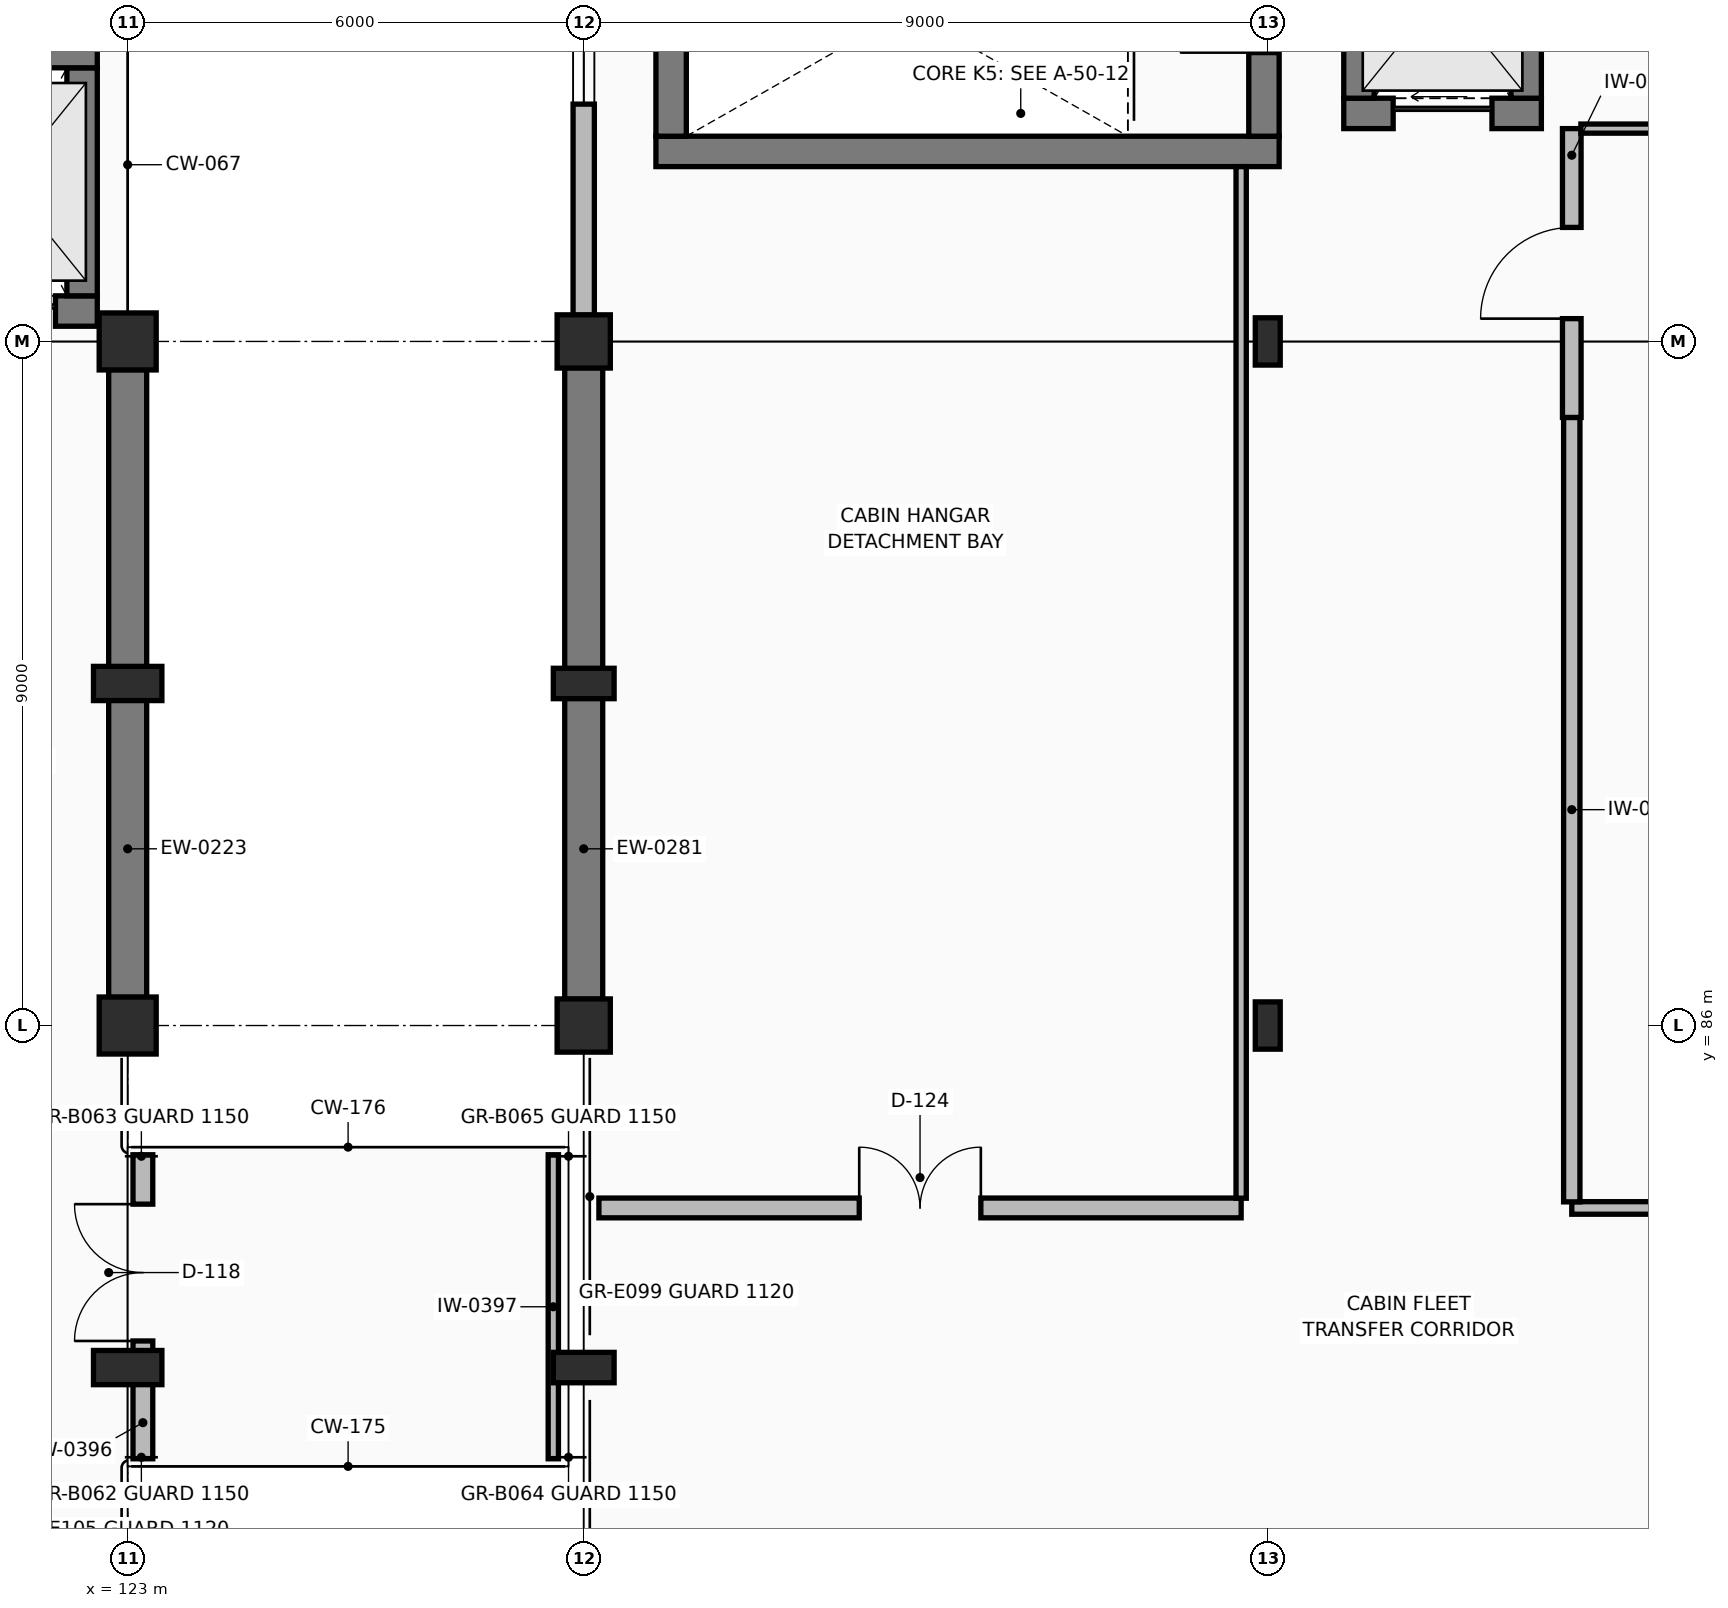
"""IFC4 building model, lengths in metres.
Left out: names, types, materials, properties, quantities, classifications, styles, units other than length and angle.
Written with IfcOpenShell. Run it as: python <this file> out.ifc"""

import sys

from ifc_helpers import new_model, si_unit, direction, frame, frame_2d, origin, origin_2d, place, context, subcontext, project, spatial, rectangle, i_section, extrude, element, fill, save


model = new_model("IFC4")
c1 = context("Model", 3, precision=1e-05, world=origin(), true_north=direction((0.0, 1.0)))
c2 = subcontext(c1, "Body", "Model", "MODEL_VIEW")
j1 = project(units=[si_unit("LENGTHUNIT", "METRE"), si_unit("PLANEANGLEUNIT", "RADIAN")], contexts=[c1])
p1 = place(None, origin())
s1 = spatial("IfcSite", under=j1, at=p1, CompositionType="ELEMENT")
p2 = place(p1, origin())
s2 = spatial("IfcBuilding", under=s1, at=p2, CompositionType="ELEMENT")
p3 = place(p2, frame((0.0, 0.0, 9.6)))
s3 = spatial("IfcBuildingStorey", under=s2, at=p3, CompositionType="ELEMENT", Elevation=9.6)
for number, where, z_axis, x_axis in (
    (1, (123.0, 86.0, 0.0), (0.0, 0.0, 1.0), (1.0, 0.0, 0.0)),
    (2, (123.0, 95.0, 0.0), (0.0, 0.0, 1.0), (1.0, 0.0, 0.0)),
):
    element("IfcColumn", number, at=place(p3, frame(where, z_axis=z_axis, x_axis=x_axis)), inside=s3, PredefinedType="COLUMN", context=c2, shape_type="SweptSolid", body=[
        extrude(rectangle(XDim=0.75, YDim=0.75, at=origin_2d()), origin(), (0.0, 0.0, 1.0), 4.8),
    ])
for number, where, z_axis, x_axis in (
    (3, (123.0, 81.5, 0.0), (0.0, 0.0, 1.0), (0.0, 1.0, 0.0)),
    (4, (123.0, 90.5, 0.0), (0.0, 0.0, 1.0), (0.0, 1.0, 0.0)),
):
    element("IfcColumn", number, at=place(p3, frame(where, z_axis=z_axis, x_axis=x_axis)), inside=s3, PredefinedType="PILASTER", context=c2, shape_type="SweptSolid", body=[
        extrude(rectangle(XDim=0.45, YDim=0.9, at=origin_2d()), origin(), (0.0, 0.0, 1.0), 4.8),
    ])
for number, where, z_axis, x_axis in (
    (5, (129.0, 86.0, 0.0), (0.0, 0.0, 1.0), (1.0, 0.0, 0.0)),
    (6, (129.0, 95.0, 0.0), (0.0, 0.0, 1.0), (1.0, 0.0, 0.0)),
):
    element("IfcColumn", number, at=place(p3, frame(where, z_axis=z_axis, x_axis=x_axis)), inside=s3, PredefinedType="COLUMN", context=c2, shape_type="SweptSolid", body=[
        extrude(rectangle(XDim=0.7, YDim=0.7, at=origin_2d()), origin(), (0.0, 0.0, 1.0), 4.8),
    ])
for number, where, z_axis, x_axis in (
    (7, (138.0, 86.0, 0.0), (0.0, 0.0, 1.0), (1.0, 0.0, 0.0)),
    (8, (138.0, 95.0, 0.0), (0.0, 0.0, 1.0), (1.0, 0.0, 0.0)),
):
    element("IfcColumn", number, at=place(p3, frame(where, z_axis=z_axis, x_axis=x_axis)), inside=s3, PredefinedType="COLUMN", context=c2, shape_type="SweptSolid", body=[
        extrude(i_section(OverallWidth=0.328, OverallDepth=0.622, WebThickness=0.015, FlangeThickness=0.024, at=origin_2d()), origin(), (0.0, 0.0, 1.0), 4.8),
    ])
for number, where, z_axis, x_axis in (
    (9, (129.0, 81.5, 0.0), (0.0, 0.0, 1.0), (0.0, 1.0, 0.0)),
    (10, (129.0, 90.5, 0.0), (0.0, 0.0, 1.0), (0.0, 1.0, 0.0)),
):
    element("IfcColumn", number, at=place(p3, frame(where, z_axis=z_axis, x_axis=x_axis)), inside=s3, PredefinedType="PILASTER", context=c2, shape_type="SweptSolid", body=[
        extrude(rectangle(XDim=0.4, YDim=0.8, at=origin_2d()), origin(), (0.0, 0.0, 1.0), 4.8),
    ])
for number, where, z_axis, x_axis in (
    (11, (123.0, 86.37, 0.0), (0.0, 0.0, 1.0), (0.0, 1.0, 0.0)),
    (12, (123.0, 90.72, 0.0), (0.0, 0.0, 1.0), (0.0, 1.0, 0.0)),
):
    element("IfcWall", number, at=place(p3, frame(where, z_axis=z_axis, x_axis=x_axis)), inside=s3, PredefinedType="SHEAR", context=c2, shape_type="SweptSolid", body=[
        extrude(rectangle(XDim=3.91, YDim=0.5, at=frame_2d((1.955, 0.0))), origin(), (0.0, 0.0, 1.0), 2.752),
    ])
for number, where, z_axis, x_axis in (
    (13, (129.0, 94.655, 0.0), (0.0, 0.0, 1.0), (0.0, -1.0, 0.0)),
    (14, (129.0, 90.305, 0.0), (0.0, 0.0, 1.0), (0.0, -1.0, 0.0)),
):
    element("IfcWall", number, at=place(p3, frame(where, z_axis=z_axis, x_axis=x_axis)), inside=s3, PredefinedType="SHEAR", context=c2, shape_type="SweptSolid", body=[
        extrude(rectangle(XDim=3.96, YDim=0.5, at=frame_2d((1.98, 0.0))), origin(), (0.0, 0.0, 1.0), 2.752),
    ])
p4 = place(p3, frame((129.0, 101.699, 0.0), z_axis=(0.0, 0.0, 1.0), x_axis=(0.0, -1.0, 0.0)))
e15 = element("IfcWall", 15, at=p4, inside=s3, PredefinedType="SOLIDWALL", context=c2, shape_type="SweptSolid", body=[
    extrude(rectangle(XDim=6.354, YDim=0.28, at=frame_2d((3.177, 0.0))), origin(), (0.0, 0.0, 1.0), 4.225),
])
p5 = place(p4, frame((1.277, 0.0, 0.9)))
e16 = element("IfcOpeningElement", 16, at=p5, cuts=e15, PredefinedType="OPENING", context=c2, shape_type="SweptSolid", body=[
    extrude(rectangle(XDim=2.3, YDim=1.5, at=frame_2d((1.15, 0.75))), frame((0.0, 0.15, 0.0), z_axis=(0.0, -1.0, 0.0), x_axis=(1.0, 0.0, 0.0)), (0.0, 0.0, 1.0), 0.3),
])
p6 = place(p3, frame((120.2, 95.4, 0.0), z_axis=(0.0, 0.0, 1.0), x_axis=(1.0, 0.0, 0.0)))
e17 = element("IfcWall", 17, at=p6, inside=s3, PredefinedType="SHEAR", context=c2, shape_type="SweptSolid", body=[
    extrude(rectangle(XDim=2.4, YDim=0.4, at=frame_2d((1.2, 0.0))), origin(), (0.0, 0.0, 1.0), 4.49),
])
p7 = place(p6, frame((0.55, 0.0, 0.0)))
e18 = element("IfcOpeningElement", 18, at=p7, cuts=e17, PredefinedType="OPENING", context=c2, shape_type="SweptSolid", body=[
    extrude(rectangle(XDim=1.3, YDim=2.25, at=frame_2d((0.65, 1.125))), frame((0.0, 0.21, 0.0), z_axis=(0.0, -1.0, 0.0), x_axis=(1.0, 0.0, 0.0)), (0.0, 0.0, 1.0), 0.42),
])
p8 = place(p3, frame((122.4, 95.6, 0.0), z_axis=(0.0, 0.0, 1.0), x_axis=(0.0, 1.0, 0.0)))
e19 = element("IfcWall", 19, at=p8, inside=s3, PredefinedType="SHEAR", context=c2, shape_type="SweptSolid", body=[
    extrude(rectangle(XDim=3.0, YDim=0.4, at=frame_2d((1.5, 0.0))), origin(), (0.0, 0.0, 1.0), 4.49),
])
p9 = place(p3, frame((122.6, 98.8, 0.0), z_axis=(0.0, 0.0, 1.0), x_axis=(-1.0, 0.0, 0.0)))
e20 = element("IfcWall", 20, at=p9, inside=s3, PredefinedType="SHEAR", context=c2, shape_type="SweptSolid", body=[
    extrude(rectangle(XDim=2.4, YDim=0.4, at=frame_2d((1.2, 0.0))), origin(), (0.0, 0.0, 1.0), 4.49),
])
p10 = place(p3, frame((129.95, 97.5, 0.0), z_axis=(0.0, 0.0, 1.0), x_axis=(1.0, 0.0, 0.0)))
e21 = element("IfcWall", 21, at=p10, inside=s3, PredefinedType="SHEAR", context=c2, shape_type="SweptSolid", body=[
    extrude(rectangle(XDim=8.2, YDim=0.4, at=frame_2d((4.1, 0.0))), origin(), (0.0, 0.0, 1.0), 4.49),
])
p11 = place(p3, frame((137.95, 97.7, 0.0), z_axis=(0.0, 0.0, 1.0), x_axis=(0.0, 1.0, 0.0)))
e22 = element("IfcWall", 22, at=p11, inside=s3, PredefinedType="SHEAR", context=c2, shape_type="SweptSolid", body=[
    extrude(rectangle(XDim=3.3, YDim=0.4, at=frame_2d((1.65, 0.0))), origin(), (0.0, 0.0, 1.0), 4.49),
])
p12 = place(p11, frame((1.1, 0.0, 0.0)))
e23 = element("IfcOpeningElement", 23, at=p12, cuts=e22, PredefinedType="OPENING", context=c2, shape_type="SweptSolid", body=[
    extrude(rectangle(XDim=1.1, YDim=2.2, at=frame_2d((0.55, 1.1))), frame((0.0, 0.21, 0.0), z_axis=(0.0, -1.0, 0.0), x_axis=(1.0, 0.0, 0.0)), (0.0, 0.0, 1.0), 0.42),
])
p13 = place(p3, frame((130.15, 101.0, 0.0), z_axis=(0.0, 0.0, 1.0), x_axis=(0.0, -1.0, 0.0)))
e24 = element("IfcWall", 24, at=p13, inside=s3, PredefinedType="SHEAR", context=c2, shape_type="SweptSolid", body=[
    extrude(rectangle(XDim=3.3, YDim=0.4, at=frame_2d((1.65, 0.0))), origin(), (0.0, 0.0, 1.0), 4.49),
])
p14 = place(p3, frame((139.0, 98.0, 0.0), z_axis=(0.0, 0.0, 1.0), x_axis=(1.0, 0.0, 0.0)))
e25 = element("IfcWall", 25, at=p14, inside=s3, PredefinedType="SHEAR", context=c2, shape_type="SweptSolid", body=[
    extrude(rectangle(XDim=2.6, YDim=0.4, at=frame_2d((1.3, 0.0))), origin(), (0.0, 0.0, 1.0), 4.49),
])
p15 = place(p14, frame((0.65, 0.0, 0.0)))
e26 = element("IfcOpeningElement", 26, at=p15, cuts=e25, PredefinedType="OPENING", context=c2, shape_type="SweptSolid", body=[
    extrude(rectangle(XDim=1.3, YDim=2.25, at=frame_2d((0.65, 1.125))), frame((0.0, 0.21, 0.0), z_axis=(0.0, -1.0, 0.0), x_axis=(1.0, 0.0, 0.0)), (0.0, 0.0, 1.0), 0.42),
])
for number, where, z_axis, x_axis in (
    (27, (141.4, 98.2, 0.0), (0.0, 0.0, 1.0), (0.0, 1.0, 0.0)),
    (28, (139.2, 101.0, 0.0), (0.0, 0.0, 1.0), (0.0, -1.0, 0.0)),
):
    element("IfcWall", number, at=place(p3, frame(where, z_axis=z_axis, x_axis=x_axis)), inside=s3, PredefinedType="SHEAR", context=c2, shape_type="SweptSolid", body=[
        extrude(rectangle(XDim=2.8, YDim=0.4, at=frame_2d((1.4, 0.0))), origin(), (0.0, 0.0, 1.0), 4.49),
    ])
p16 = place(p3, frame((123.2, 80.3, 0.0), z_axis=(0.0, 0.0, 1.0), x_axis=(0.0, 1.0, 0.0)))
e29 = element("IfcWall", 29, at=p16, inside=s3, PredefinedType="PARTITIONING", context=c2, shape_type="SweptSolid", body=[
    extrude(rectangle(XDim=4.0, YDim=0.26, at=frame_2d((2.0, 0.0))), origin(), (0.0, 0.0, 1.0), 2.742),
])
p17 = place(p16, frame((1.55, 0.0, 0.0)))
e30 = element("IfcOpeningElement", 30, at=p17, cuts=e29, PredefinedType="OPENING", context=c2, shape_type="SweptSolid", body=[
    extrude(rectangle(XDim=1.8, YDim=2.3, at=frame_2d((0.9, 1.15))), frame((0.0, 0.14, 0.0), z_axis=(0.0, -1.0, 0.0), x_axis=(1.0, 0.0, 0.0)), (0.0, 0.0, 1.0), 0.28),
])
p18 = place(p3, frame((128.6, 80.3, 0.0), z_axis=(0.0, 0.0, 1.0), x_axis=(0.0, 1.0, 0.0)))
e31 = element("IfcWall", 31, at=p18, inside=s3, PredefinedType="PARTITIONING", context=c2, shape_type="SweptSolid", body=[
    extrude(rectangle(XDim=4.0, YDim=0.135, at=frame_2d((2.0, 0.0))), origin(), (0.0, 0.0, 1.0), 2.742),
])
p19 = place(p3, frame((129.2, 83.6, 0.0), z_axis=(0.0, 0.0, 1.0), x_axis=(1.0, 0.0, 0.0)))
e32 = element("IfcWall", 32, at=p19, inside=s3, PredefinedType="PARTITIONING", context=c2, shape_type="SweptSolid", body=[
    extrude(rectangle(XDim=8.45, YDim=0.26, at=frame_2d((4.225, 0.0))), origin(), (0.0, 0.0, 1.0), 4.435),
])
p20 = place(p19, frame((3.425, 0.0, 0.0)))
e33 = element("IfcOpeningElement", 33, at=p20, cuts=e32, PredefinedType="OPENING", context=c2, shape_type="SweptSolid", body=[
    extrude(rectangle(XDim=1.6, YDim=2.25, at=frame_2d((0.8, 1.125))), frame((0.0, 0.14, 0.0), z_axis=(0.0, -1.0, 0.0), x_axis=(1.0, 0.0, 0.0)), (0.0, 0.0, 1.0), 0.28),
])
p21 = place(p3, frame((137.65, 83.728, 0.0), z_axis=(0.0, 0.0, 1.0), x_axis=(0.0, 1.0, 0.0)))
e34 = element("IfcWall", 34, at=p21, inside=s3, PredefinedType="PARTITIONING", context=c2, shape_type="SweptSolid", body=[
    extrude(rectangle(XDim=13.572, YDim=0.135, at=frame_2d((6.786, 0.0))), origin(), (0.0, 0.0, 1.0), 3.753),
])
p22 = place(p3, frame((142.0, 83.6, 0.0), z_axis=(0.0, 0.0, 1.0), x_axis=(1.0, 0.0, 0.0)))
e35 = element("IfcWall", 35, at=p22, inside=s3, PredefinedType="PARTITIONING", context=c2, shape_type="SweptSolid", body=[
    extrude(rectangle(XDim=9.45, YDim=0.165, at=frame_2d((4.725, 0.0))), origin(), (0.0, 0.0, 1.0), 3.753),
])
p23 = place(p22, frame((3.925, 0.0, 0.0)))
e36 = element("IfcOpeningElement", 36, at=p23, cuts=e35, PredefinedType="OPENING", context=c2, shape_type="SweptSolid", body=[
    extrude(rectangle(XDim=1.6, YDim=2.25, at=frame_2d((0.8, 1.125))), frame((0.0, 0.093, 0.0), z_axis=(0.0, -1.0, 0.0), x_axis=(1.0, 0.0, 0.0)), (0.0, 0.0, 1.0), 0.185),
])
p24 = place(p3, frame((142.0, 83.68, 0.0), z_axis=(0.0, 0.0, 1.0), x_axis=(0.0, 1.0, 0.0)))
e37 = element("IfcWall", 37, at=p24, inside=s3, PredefinedType="PARTITIONING", context=c2, shape_type="SweptSolid", body=[
    extrude(rectangle(XDim=10.32, YDim=0.215, at=frame_2d((5.16, 0.0))), origin(), (0.0, 0.0, 1.0), 3.753),
])
p25 = place(p3, frame((142.0, 94.0, 0.0), z_axis=(0.0, 0.0, 1.0), x_axis=(0.0, 1.0, 0.0)))
e38 = element("IfcWall", 38, at=p25, inside=s3, PredefinedType="PARTITIONING", context=c2, shape_type="SweptSolid", body=[
    extrude(rectangle(XDim=3.8, YDim=0.245, at=frame_2d((1.9, 0.0))), origin(), (0.0, 0.0, 1.0), 3.753),
])
p26 = place(p25, frame((1.3, 0.0, 0.0)))
e39 = element("IfcOpeningElement", 39, at=p26, cuts=e38, PredefinedType="OPENING", context=c2, shape_type="SweptSolid", body=[
    extrude(rectangle(XDim=1.2, YDim=2.2, at=frame_2d((0.6, 1.1))), frame((0.0, 0.133, 0.0), z_axis=(0.0, -1.0, 0.0), x_axis=(1.0, 0.0, 0.0)), (0.0, 0.0, 1.0), 0.265),
])
p27 = place(p3, frame((142.12, 97.8, 0.0), z_axis=(0.0, 0.0, 1.0), x_axis=(1.0, 0.0, 0.0)))
e40 = element("IfcWall", 40, at=p27, inside=s3, PredefinedType="PARTITIONING", context=c2, shape_type="SweptSolid", body=[
    extrude(rectangle(XDim=5.88, YDim=0.12, at=frame_2d((2.94, 0.0))), origin(), (0.0, 0.0, 1.0), 3.753),
])
p28 = place(p27, frame((2.415, 0.0, 0.0)))
e41 = element("IfcOpeningElement", 41, at=p28, cuts=e40, PredefinedType="OPENING", context=c2, shape_type="SweptSolid", body=[
    extrude(rectangle(XDim=1.05, YDim=2.15, at=frame_2d((0.525, 1.075))), frame((0.0, 0.07, 0.0), z_axis=(0.0, -1.0, 0.0), x_axis=(1.0, 0.0, 0.0)), (0.0, 0.0, 1.0), 0.14),
])
p29 = place(p5, origin())
e42 = element("IfcWindow", 42, at=p29, inside=s3, PartitioningType="SINGLE_PANEL", PredefinedType="WINDOW", context=c2, shape_type="SweptSolid", body=[
    extrude(rectangle(XDim=2.3, YDim=1.5, at=frame_2d((1.15, 0.75))), frame((0.0, 0.03, 0.0), z_axis=(0.0, -1.0, 0.0), x_axis=(1.0, 0.0, 0.0)), (0.0, 0.0, 1.0), 0.06),
])
fill(e16, e42)
p30 = place(p7, origin())
e43 = element("IfcDoor", 43, at=p30, inside=s3, OperationType="SLIDING_TO_LEFT", PredefinedType="DOOR", context=c2, shape_type="SweptSolid", body=[
    extrude(rectangle(XDim=1.3, YDim=2.25, at=frame_2d((0.65, 1.125))), frame((0.0, 0.025, 0.0), z_axis=(0.0, -1.0, 0.0), x_axis=(1.0, 0.0, 0.0)), (0.0, 0.0, 1.0), 0.05),
])
fill(e18, e43)
p31 = place(p15, origin())
e44 = element("IfcDoor", 44, at=p31, inside=s3, OperationType="SLIDING_TO_LEFT", PredefinedType="DOOR", context=c2, shape_type="SweptSolid", body=[
    extrude(rectangle(XDim=1.3, YDim=2.25, at=frame_2d((0.65, 1.125))), frame((0.0, 0.025, 0.0), z_axis=(0.0, -1.0, 0.0), x_axis=(1.0, 0.0, 0.0)), (0.0, 0.0, 1.0), 0.05),
])
fill(e26, e44)
p32 = place(p17, origin())
e45 = element("IfcDoor", 45, at=p32, inside=s3, OperationType="DOUBLE_SWING_LEFT", PredefinedType="DOOR", context=c2, shape_type="SweptSolid", body=[
    extrude(rectangle(XDim=1.8, YDim=2.3, at=frame_2d((0.9, 1.15))), frame((0.0, 0.025, 0.0), z_axis=(0.0, -1.0, 0.0), x_axis=(1.0, 0.0, 0.0)), (0.0, 0.0, 1.0), 0.05),
])
fill(e30, e45)
p33 = place(p20, origin())
e46 = element("IfcDoor", 46, at=p33, inside=s3, OperationType="DOUBLE_SWING_LEFT", PredefinedType="DOOR", context=c2, shape_type="SweptSolid", body=[
    extrude(rectangle(XDim=1.6, YDim=2.25, at=frame_2d((0.8, 1.125))), frame((0.0, 0.025, 0.0), z_axis=(0.0, -1.0, 0.0), x_axis=(1.0, 0.0, 0.0)), (0.0, 0.0, 1.0), 0.05),
])
fill(e33, e46)
p34 = place(p26, origin())
e47 = element("IfcDoor", 47, at=p34, inside=s3, OperationType="SINGLE_SWING_LEFT", PredefinedType="DOOR", context=c2, shape_type="SweptSolid", body=[
    extrude(rectangle(XDim=1.2, YDim=2.2, at=frame_2d((0.6, 1.1))), frame((0.0, 0.025, 0.0), z_axis=(0.0, -1.0, 0.0), x_axis=(1.0, 0.0, 0.0)), (0.0, 0.0, 1.0), 0.05),
])
fill(e39, e47)
save(model, sys.argv[1])
